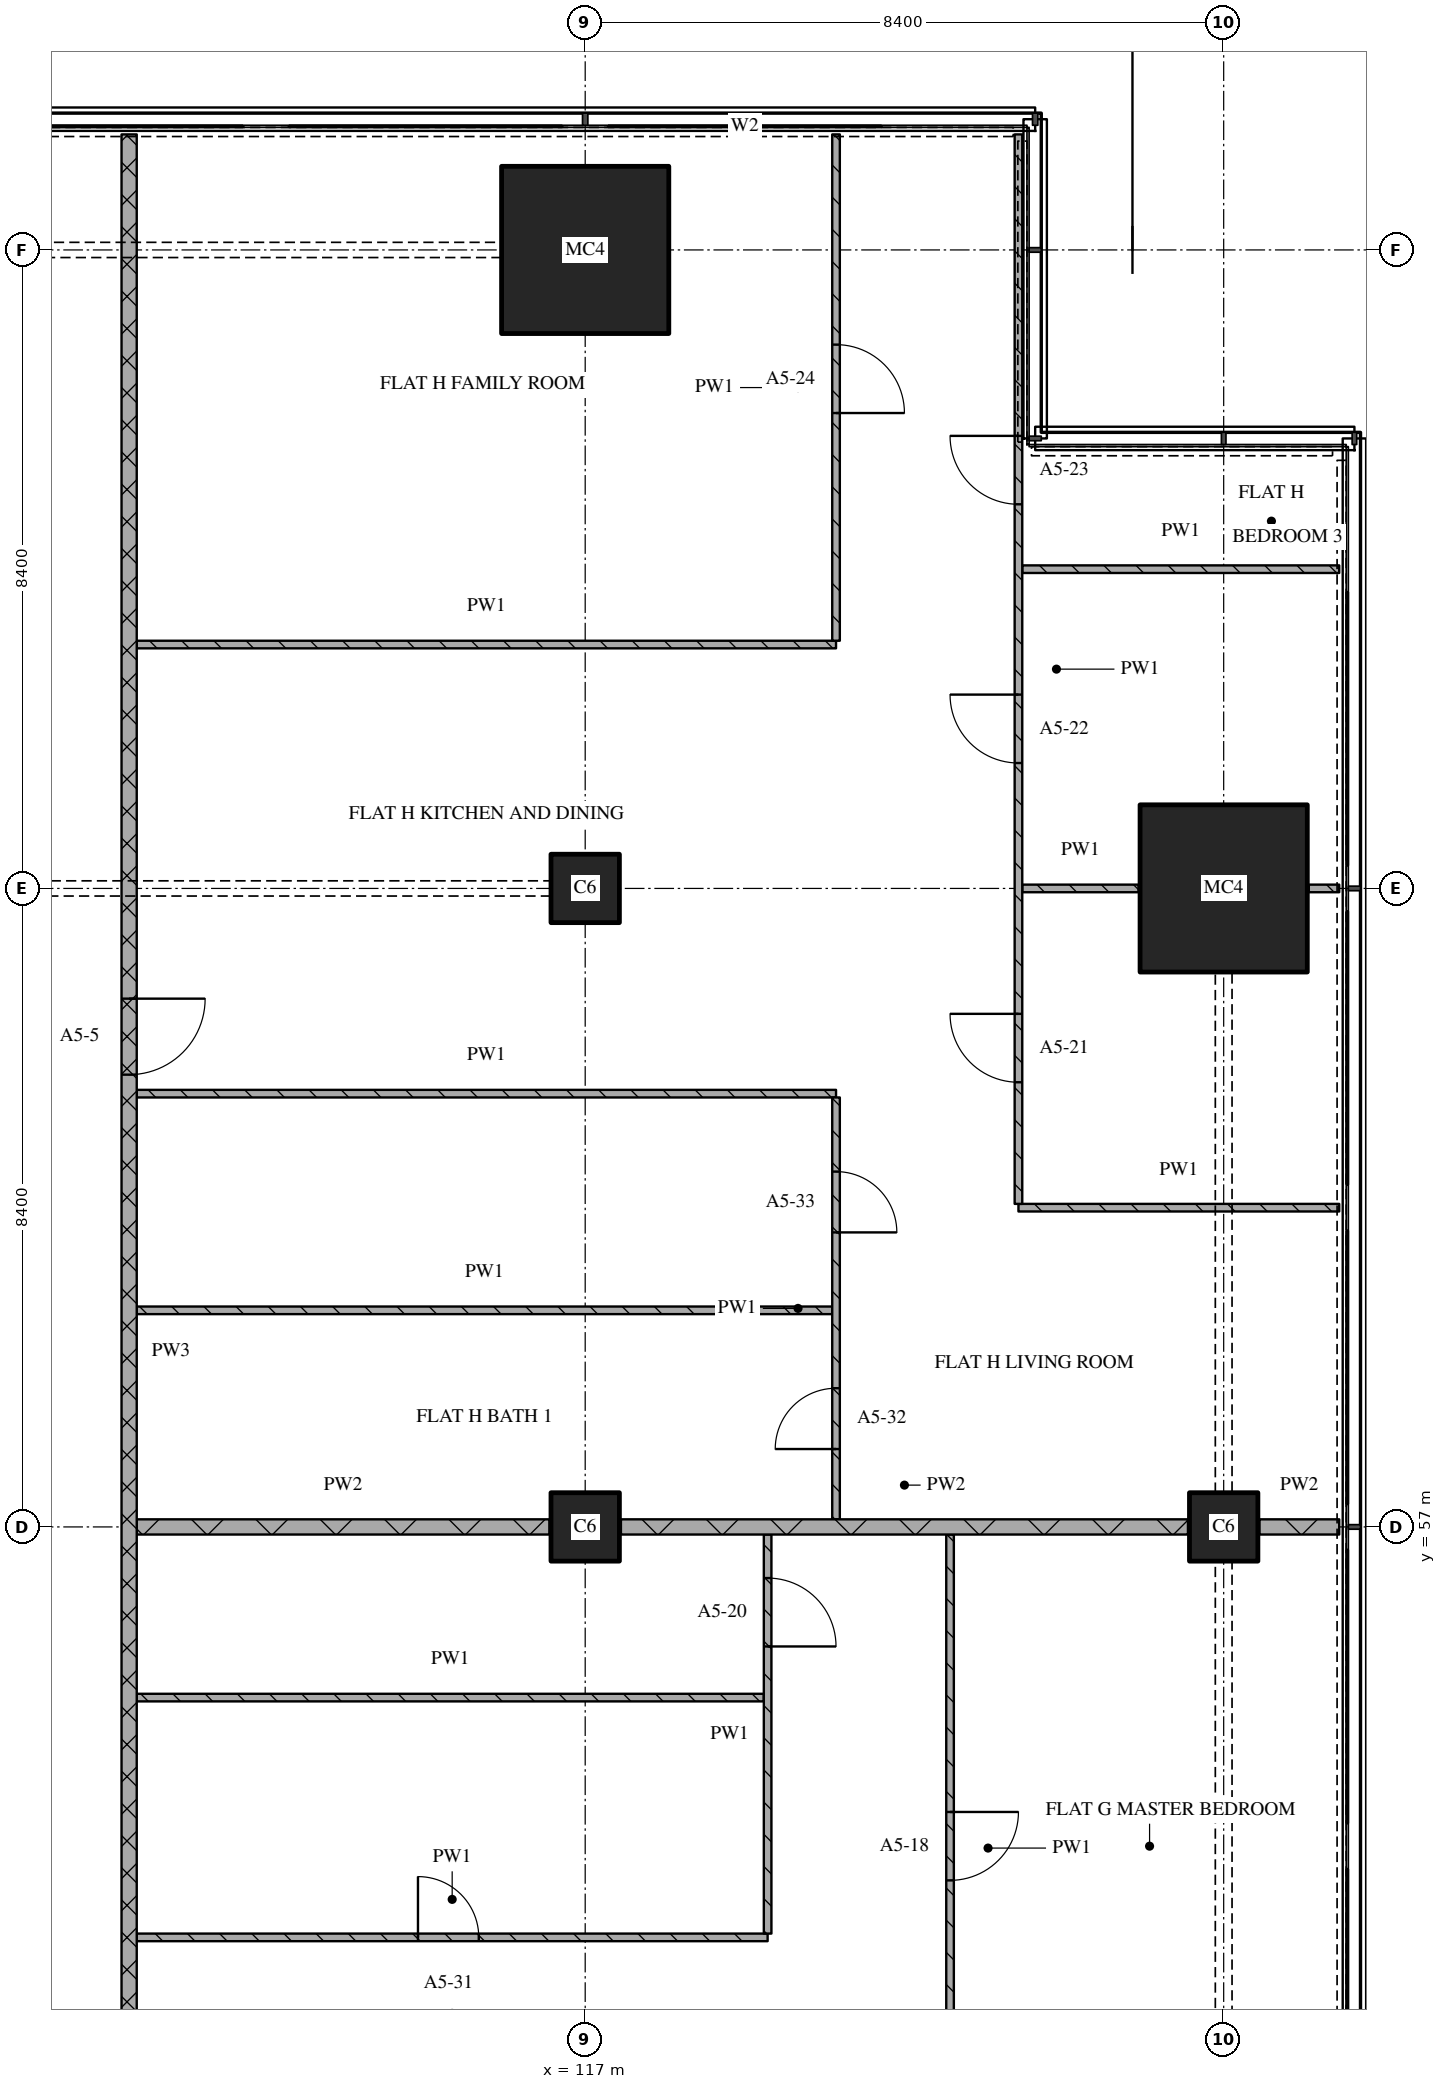
"""IFC4 building model, lengths in metres.
Left out: names, types, materials, properties, quantities, classifications, styles, units other than length and angle.
Written with IfcOpenShell. Run it as: python <this file> out.ifc"""

import sys

from ifc_helpers import new_model, si_unit, direction, frame, frame_2d, origin, origin_2d, place, context, subcontext, project, spatial, rectangle, extrude, element, fill, save


model = new_model("IFC4")
c1 = context("Model", 3, precision=1e-05, world=origin(), true_north=direction((0.0, 1.0)))
c2 = subcontext(c1, "Body", "Model", "MODEL_VIEW")
j1 = project(units=[si_unit("LENGTHUNIT", "METRE"), si_unit("PLANEANGLEUNIT", "RADIAN")], contexts=[c1])
p1 = place(None, origin())
s1 = spatial("IfcSite", under=j1, at=p1, CompositionType="ELEMENT")
p2 = place(p1, origin())
s2 = spatial("IfcBuilding", under=s1, at=p2, CompositionType="ELEMENT")
p3 = place(p2, frame((0.0, 0.0, 80.4)))
s3 = spatial("IfcBuildingStorey", under=s2, at=p3, CompositionType="ELEMENT", Elevation=80.4)
for number, where, z_axis, x_axis in (
    (1, (117.0, 57.0, 0.0), (0.0, 0.0, 1.0), (1.0, 0.0, 0.0)),
    (2, (117.0, 65.4, 0.0), (0.0, 0.0, 1.0), (1.0, 0.0, 0.0)),
):
    element("IfcColumn", number, at=place(p3, frame(where, z_axis=z_axis, x_axis=x_axis)), inside=s3, PredefinedType="COLUMN", context=c2, shape_type="SweptSolid", body=[
        extrude(rectangle(XDim=0.9, YDim=0.9, at=origin_2d()), origin(), (0.0, 0.0, 1.0), 3.6),
    ])
p4 = place(p3, frame((117.0, 73.8, 0.0), z_axis=(0.0, 0.0, 1.0), x_axis=(1.0, 0.0, 0.0)))
e3 = element("IfcColumn", 3, at=p4, inside=s3, PredefinedType="COLUMN", context=c2, shape_type="SweptSolid", body=[
    extrude(rectangle(XDim=2.2, YDim=2.2, at=origin_2d()), origin(), (0.0, 0.0, 1.0), 3.6),
])
p5 = place(p3, frame((125.4, 57.0, 0.0), z_axis=(0.0, 0.0, 1.0), x_axis=(1.0, 0.0, 0.0)))
e4 = element("IfcColumn", 4, at=p5, inside=s3, PredefinedType="COLUMN", context=c2, shape_type="SweptSolid", body=[
    extrude(rectangle(XDim=0.9, YDim=0.9, at=origin_2d()), origin(), (0.0, 0.0, 1.0), 3.6),
])
p6 = place(p3, frame((125.4, 65.4, 0.0), z_axis=(0.0, 0.0, 1.0), x_axis=(1.0, 0.0, 0.0)))
e5 = element("IfcColumn", 5, at=p6, inside=s3, PredefinedType="COLUMN", context=c2, shape_type="SweptSolid", body=[
    extrude(rectangle(XDim=2.2, YDim=2.2, at=origin_2d()), origin(), (0.0, 0.0, 1.0), 3.6),
])
p7 = place(p3, frame((111.1, 51.6, 0.0), z_axis=(0.0, 0.0, 1.0), x_axis=(1.0, 0.0, 0.0)))
e6 = element("IfcWall", 6, at=p7, inside=s3, PredefinedType="PARTITIONING", context=c2, shape_type="SweptSolid", body=[
    extrude(rectangle(XDim=8.3, YDim=0.1, at=frame_2d((4.15, 0.0))), origin(), (0.0, 0.0, 1.0), 3.3),
])
p8 = place(p7, frame((3.7, 0.0, 0.0)))
e7 = element("IfcOpeningElement", 7, at=p8, cuts=e6, PredefinedType="OPENING", context=c2, shape_type="SweptSolid", body=[
    extrude(rectangle(XDim=0.8, YDim=2.1, at=frame_2d((0.4, 1.05))), frame((0.0, 0.06, 0.0), z_axis=(0.0, -1.0, 0.0), x_axis=(1.0, 0.0, 0.0)), (0.0, 0.0, 1.0), 0.12),
])
p9 = place(p3, frame((111.1, 54.755, 0.0), z_axis=(0.0, 0.0, 1.0), x_axis=(1.0, 0.0, 0.0)))
e8 = element("IfcWall", 8, at=p9, inside=s3, PredefinedType="PARTITIONING", context=c2, shape_type="SweptSolid", body=[
    extrude(rectangle(XDim=8.25, YDim=0.1, at=frame_2d((4.125, 0.0))), origin(), (0.0, 0.0, 1.0), 3.3),
])
p10 = place(p3, frame((111.1, 57.0, 0.0), z_axis=(0.0, 0.0, 1.0), x_axis=(1.0, 0.0, 0.0)))
e9 = element("IfcWall", 9, at=p10, inside=s3, PredefinedType="PARTITIONING", context=c2, shape_type="SweptSolid", body=[
    extrude(rectangle(XDim=5.43, YDim=0.2, at=frame_2d((2.715, 0.0))), origin(), (0.0, 0.0, 1.0), 3.3),
])
p11 = place(p3, frame((117.47, 57.0, 0.0), z_axis=(0.0, 0.0, 1.0), x_axis=(1.0, 0.0, 0.0)))
e10 = element("IfcWall", 10, at=p11, inside=s3, PredefinedType="PARTITIONING", context=c2, shape_type="SweptSolid", body=[
    extrude(rectangle(XDim=7.46, YDim=0.2, at=frame_2d((3.73, 0.0))), origin(), (0.0, 0.0, 1.0), 3.3),
])
p12 = place(p3, frame((125.87, 57.0, 0.0), z_axis=(0.0, 0.0, 1.0), x_axis=(1.0, 0.0, 0.0)))
e11 = element("IfcWall", 11, at=p12, inside=s3, PredefinedType="PARTITIONING", context=c2, shape_type="SweptSolid", body=[
    extrude(rectangle(XDim=1.05, YDim=0.2, at=frame_2d((0.525, 0.0))), origin(), (0.0, 0.0, 1.0), 3.3),
])
p13 = place(p3, frame((111.1, 59.85, 0.0), z_axis=(0.0, 0.0, 1.0), x_axis=(1.0, 0.0, 0.0)))
e12 = element("IfcWall", 12, at=p13, inside=s3, PredefinedType="PARTITIONING", context=c2, shape_type="SweptSolid", body=[
    extrude(rectangle(XDim=9.15, YDim=0.1, at=frame_2d((4.575, 0.0))), origin(), (0.0, 0.0, 1.0), 3.3),
])
p14 = place(p3, frame((122.7, 61.2, 0.0), z_axis=(0.0, 0.0, 1.0), x_axis=(1.0, 0.0, 0.0)))
e13 = element("IfcWall", 13, at=p14, inside=s3, PredefinedType="PARTITIONING", context=c2, shape_type="SweptSolid", body=[
    extrude(rectangle(XDim=4.22, YDim=0.1, at=frame_2d((2.11, 0.0))), origin(), (0.0, 0.0, 1.0), 3.3),
])
p15 = place(p3, frame((111.1, 62.7, 0.0), z_axis=(0.0, 0.0, 1.0), x_axis=(1.0, 0.0, 0.0)))
e14 = element("IfcWall", 14, at=p15, inside=s3, PredefinedType="PARTITIONING", context=c2, shape_type="SweptSolid", body=[
    extrude(rectangle(XDim=9.2, YDim=0.1, at=frame_2d((4.6, 0.0))), origin(), (0.0, 0.0, 1.0), 3.3),
])
p16 = place(p3, frame((122.75, 65.4, 0.0), z_axis=(0.0, 0.0, 1.0), x_axis=(1.0, 0.0, 0.0)))
e15 = element("IfcWall", 15, at=p16, inside=s3, PredefinedType="PARTITIONING", context=c2, shape_type="SweptSolid", body=[
    extrude(rectangle(XDim=1.53, YDim=0.1, at=frame_2d((0.765, 0.0))), origin(), (0.0, 0.0, 1.0), 2.41),
])
p17 = place(p3, frame((126.52, 65.4, 0.0), z_axis=(0.0, 0.0, 1.0), x_axis=(1.0, 0.0, 0.0)))
e16 = element("IfcWall", 16, at=p17, inside=s3, PredefinedType="PARTITIONING", context=c2, shape_type="SweptSolid", body=[
    extrude(rectangle(XDim=0.4, YDim=0.1, at=frame_2d((0.2, 0.0))), origin(), (0.0, 0.0, 1.0), 3.3),
])
p18 = place(p3, frame((111.1, 68.609, 0.0), z_axis=(0.0, 0.0, 1.0), x_axis=(1.0, 0.0, 0.0)))
e17 = element("IfcWall", 17, at=p18, inside=s3, PredefinedType="PARTITIONING", context=c2, shape_type="SweptSolid", body=[
    extrude(rectangle(XDim=9.2, YDim=0.1, at=frame_2d((4.6, 0.0))), origin(), (0.0, 0.0, 1.0), 3.3),
])
p19 = place(p3, frame((122.75, 69.6, 0.0), z_axis=(0.0, 0.0, 1.0), x_axis=(1.0, 0.0, 0.0)))
e18 = element("IfcWall", 18, at=p19, inside=s3, PredefinedType="PARTITIONING", context=c2, shape_type="SweptSolid", body=[
    extrude(rectangle(XDim=4.17, YDim=0.1, at=frame_2d((2.085, 0.0))), origin(), (0.0, 0.0, 1.0), 3.3),
])
p20 = place(p3, frame((111.0, 75.32, 0.0), z_axis=(0.0, 0.0, 1.0), x_axis=(0.0, -1.0, 0.0)))
e19 = element("IfcWall", 19, at=p20, inside=s3, PredefinedType="PARTITIONING", context=c2, shape_type="SweptSolid", body=[
    extrude(rectangle(XDim=32.02, YDim=0.2, at=frame_2d((16.01, 0.0))), origin(), (0.0, 0.0, 1.0), 3.3),
])
p21 = place(p20, frame((11.37, 0.0, 0.0)))
e20 = element("IfcOpeningElement", 20, at=p21, cuts=e19, PredefinedType="OPENING", context=c2, shape_type="SweptSolid", body=[
    extrude(rectangle(XDim=1.0, YDim=2.1, at=frame_2d((0.5, 1.05))), frame((0.0, 0.11, 0.0), z_axis=(0.0, -1.0, 0.0), x_axis=(1.0, 0.0, 0.0)), (0.0, 0.0, 1.0), 0.22),
])
p22 = place(p3, frame((119.4, 51.65, 0.0), z_axis=(0.0, 0.0, 1.0), x_axis=(0.0, 1.0, 0.0)))
e21 = element("IfcWall", 21, at=p22, inside=s3, PredefinedType="PARTITIONING", context=c2, shape_type="SweptSolid", body=[
    extrude(rectangle(XDim=5.25, YDim=0.1, at=frame_2d((2.625, 0.0))), origin(), (0.0, 0.0, 1.0), 3.3),
])
p23 = place(p22, frame((3.777, 0.0, 0.0)))
e22 = element("IfcOpeningElement", 22, at=p23, cuts=e21, PredefinedType="OPENING", context=c2, shape_type="SweptSolid", body=[
    extrude(rectangle(XDim=0.9, YDim=2.1, at=frame_2d((0.45, 1.05))), frame((0.0, 0.06, 0.0), z_axis=(0.0, -1.0, 0.0), x_axis=(1.0, 0.0, 0.0)), (0.0, 0.0, 1.0), 0.12),
])
p24 = place(p3, frame((120.3, 57.1, 0.0), z_axis=(0.0, 0.0, 1.0), x_axis=(0.0, 1.0, 0.0)))
e23 = element("IfcWall", 23, at=p24, inside=s3, PredefinedType="PARTITIONING", context=c2, shape_type="SweptSolid", body=[
    extrude(rectangle(XDim=5.55, YDim=0.1, at=frame_2d((2.775, 0.0))), origin(), (0.0, 0.0, 1.0), 3.3),
])
p25 = place(p24, frame((0.925, 0.0, 0.0)))
e24 = element("IfcOpeningElement", 24, at=p25, cuts=e23, PredefinedType="OPENING", context=c2, shape_type="SweptSolid", body=[
    extrude(rectangle(XDim=0.8, YDim=2.1, at=frame_2d((0.4, 1.05))), frame((0.0, 0.06, 0.0), z_axis=(0.0, -1.0, 0.0), x_axis=(1.0, 0.0, 0.0)), (0.0, 0.0, 1.0), 0.12),
])
p26 = place(p24, frame((3.775, 0.0, 0.0)))
e25 = element("IfcOpeningElement", 25, at=p26, cuts=e23, PredefinedType="OPENING", context=c2, shape_type="SweptSolid", body=[
    extrude(rectangle(XDim=0.8, YDim=2.1, at=frame_2d((0.4, 1.05))), frame((0.0, 0.06, 0.0), z_axis=(0.0, -1.0, 0.0), x_axis=(1.0, 0.0, 0.0)), (0.0, 0.0, 1.0), 0.12),
])
p27 = place(p3, frame((120.3, 68.659, 0.0), z_axis=(0.0, 0.0, 1.0), x_axis=(0.0, 1.0, 0.0)))
e26 = element("IfcWall", 26, at=p27, inside=s3, PredefinedType="PARTITIONING", context=c2, shape_type="SweptSolid", body=[
    extrude(rectangle(XDim=6.661, YDim=0.1, at=frame_2d((3.331, 0.0))), origin(), (0.0, 0.0, 1.0), 3.3),
])
p28 = place(p27, frame((2.996, 0.0, 0.0)))
e27 = element("IfcOpeningElement", 27, at=p28, cuts=e26, PredefinedType="OPENING", context=c2, shape_type="SweptSolid", body=[
    extrude(rectangle(XDim=0.9, YDim=2.1, at=frame_2d((0.45, 1.05))), frame((0.0, 0.06, 0.0), z_axis=(0.0, -1.0, 0.0), x_axis=(1.0, 0.0, 0.0)), (0.0, 0.0, 1.0), 0.12),
])
p29 = place(p3, frame((121.8, 56.9, 0.0), z_axis=(0.0, 0.0, 1.0), x_axis=(0.0, -1.0, 0.0)))
e28 = element("IfcWall", 28, at=p29, inside=s3, PredefinedType="PARTITIONING", context=c2, shape_type="SweptSolid", body=[
    extrude(rectangle(XDim=8.25, YDim=0.1, at=frame_2d((4.125, 0.0))), origin(), (0.0, 0.0, 1.0), 3.3),
])
p30 = place(p29, frame((3.65, 0.0, 0.0)))
e29 = element("IfcOpeningElement", 29, at=p30, cuts=e28, PredefinedType="OPENING", context=c2, shape_type="SweptSolid", body=[
    extrude(rectangle(XDim=0.9, YDim=2.1, at=frame_2d((0.45, 1.05))), frame((0.0, 0.06, 0.0), z_axis=(0.0, -1.0, 0.0), x_axis=(1.0, 0.0, 0.0)), (0.0, 0.0, 1.0), 0.12),
])
p31 = place(p3, frame((122.7, 75.32, 0.0), z_axis=(0.0, 0.0, 1.0), x_axis=(0.0, -1.0, 0.0)))
e30 = element("IfcWall", 30, at=p31, inside=s3, PredefinedType="PARTITIONING", context=c2, shape_type="SweptSolid", body=[
    extrude(rectangle(XDim=14.07, YDim=0.1, at=frame_2d((7.035, 0.0))), origin(), (0.0, 0.0, 1.0), 3.3),
])
p32 = place(p31, frame((3.966, 0.0, 0.0)))
e31 = element("IfcOpeningElement", 31, at=p32, cuts=e30, PredefinedType="OPENING", context=c2, shape_type="SweptSolid", body=[
    extrude(rectangle(XDim=0.9, YDim=2.1, at=frame_2d((0.45, 1.05))), frame((0.0, 0.06, 0.0), z_axis=(0.0, -1.0, 0.0), x_axis=(1.0, 0.0, 0.0)), (0.0, 0.0, 1.0), 0.12),
])
p33 = place(p31, frame((7.37, 0.0, 0.0)))
e32 = element("IfcOpeningElement", 32, at=p33, cuts=e30, PredefinedType="OPENING", context=c2, shape_type="SweptSolid", body=[
    extrude(rectangle(XDim=0.9, YDim=2.1, at=frame_2d((0.45, 1.05))), frame((0.0, 0.06, 0.0), z_axis=(0.0, -1.0, 0.0), x_axis=(1.0, 0.0, 0.0)), (0.0, 0.0, 1.0), 0.12),
])
p34 = place(p31, frame((11.57, 0.0, 0.0)))
e33 = element("IfcOpeningElement", 33, at=p34, cuts=e30, PredefinedType="OPENING", context=c2, shape_type="SweptSolid", body=[
    extrude(rectangle(XDim=0.9, YDim=2.1, at=frame_2d((0.45, 1.05))), frame((0.0, 0.06, 0.0), z_axis=(0.0, -1.0, 0.0), x_axis=(1.0, 0.0, 0.0)), (0.0, 0.0, 1.0), 0.12),
])
p35 = place(p8, origin())
e34 = element("IfcDoor", 34, at=p35, inside=s3, OperationType="SINGLE_SWING_LEFT", PredefinedType="DOOR", context=c2, shape_type="SweptSolid", body=[
    extrude(rectangle(XDim=0.8, YDim=2.1, at=frame_2d((0.4, 1.05))), frame((0.0, 0.025, 0.0), z_axis=(0.0, -1.0, 0.0), x_axis=(1.0, 0.0, 0.0)), (0.0, 0.0, 1.0), 0.05),
])
fill(e7, e34)
p36 = place(p21, origin())
e35 = element("IfcDoor", 35, at=p36, inside=s3, OperationType="SINGLE_SWING_LEFT", PredefinedType="DOOR", context=c2, shape_type="SweptSolid", body=[
    extrude(rectangle(XDim=1.0, YDim=2.1, at=frame_2d((0.5, 1.05))), frame((0.0, 0.025, 0.0), z_axis=(0.0, -1.0, 0.0), x_axis=(1.0, 0.0, 0.0)), (0.0, 0.0, 1.0), 0.05),
])
fill(e20, e35)
p37 = place(p23, origin())
e36 = element("IfcDoor", 36, at=p37, inside=s3, OperationType="SINGLE_SWING_RIGHT", PredefinedType="DOOR", context=c2, shape_type="SweptSolid", body=[
    extrude(rectangle(XDim=0.9, YDim=2.1, at=frame_2d((0.45, 1.05))), frame((0.0, 0.025, 0.0), z_axis=(0.0, -1.0, 0.0), x_axis=(1.0, 0.0, 0.0)), (0.0, 0.0, 1.0), 0.05),
])
fill(e22, e36)
p38 = place(p25, origin())
e37 = element("IfcDoor", 37, at=p38, inside=s3, OperationType="SINGLE_SWING_LEFT", PredefinedType="DOOR", context=c2, shape_type="SweptSolid", body=[
    extrude(rectangle(XDim=0.8, YDim=2.1, at=frame_2d((0.4, 1.05))), frame((0.0, 0.025, 0.0), z_axis=(0.0, -1.0, 0.0), x_axis=(1.0, 0.0, 0.0)), (0.0, 0.0, 1.0), 0.05),
])
fill(e24, e37)
p39 = place(p26, origin())
e38 = element("IfcDoor", 38, at=p39, inside=s3, OperationType="SINGLE_SWING_RIGHT", PredefinedType="DOOR", context=c2, shape_type="SweptSolid", body=[
    extrude(rectangle(XDim=0.8, YDim=2.1, at=frame_2d((0.4, 1.05))), frame((0.0, 0.025, 0.0), z_axis=(0.0, -1.0, 0.0), x_axis=(1.0, 0.0, 0.0)), (0.0, 0.0, 1.0), 0.05),
])
fill(e25, e38)
p40 = place(p28, origin())
e39 = element("IfcDoor", 39, at=p40, inside=s3, OperationType="SINGLE_SWING_RIGHT", PredefinedType="DOOR", context=c2, shape_type="SweptSolid", body=[
    extrude(rectangle(XDim=0.9, YDim=2.1, at=frame_2d((0.45, 1.05))), frame((0.0, 0.025, 0.0), z_axis=(0.0, -1.0, 0.0), x_axis=(1.0, 0.0, 0.0)), (0.0, 0.0, 1.0), 0.05),
])
fill(e27, e39)
p41 = place(p30, origin())
e40 = element("IfcDoor", 40, at=p41, inside=s3, OperationType="SINGLE_SWING_LEFT", PredefinedType="DOOR", context=c2, shape_type="SweptSolid", body=[
    extrude(rectangle(XDim=0.9, YDim=2.1, at=frame_2d((0.45, 1.05))), frame((0.0, 0.025, 0.0), z_axis=(0.0, -1.0, 0.0), x_axis=(1.0, 0.0, 0.0)), (0.0, 0.0, 1.0), 0.05),
])
fill(e29, e40)
p42 = place(p32, origin())
e41 = element("IfcDoor", 41, at=p42, inside=s3, OperationType="SINGLE_SWING_RIGHT", PredefinedType="DOOR", context=c2, shape_type="SweptSolid", body=[
    extrude(rectangle(XDim=0.9, YDim=2.1, at=frame_2d((0.45, 1.05))), frame((0.0, 0.025, 0.0), z_axis=(0.0, -1.0, 0.0), x_axis=(1.0, 0.0, 0.0)), (0.0, 0.0, 1.0), 0.05),
])
fill(e31, e41)
p43 = place(p33, origin())
e42 = element("IfcDoor", 42, at=p43, inside=s3, OperationType="SINGLE_SWING_RIGHT", PredefinedType="DOOR", context=c2, shape_type="SweptSolid", body=[
    extrude(rectangle(XDim=0.9, YDim=2.1, at=frame_2d((0.45, 1.05))), frame((0.0, 0.025, 0.0), z_axis=(0.0, -1.0, 0.0), x_axis=(1.0, 0.0, 0.0)), (0.0, 0.0, 1.0), 0.05),
])
fill(e32, e42)
p44 = place(p34, origin())
e43 = element("IfcDoor", 43, at=p44, inside=s3, OperationType="SINGLE_SWING_RIGHT", PredefinedType="DOOR", context=c2, shape_type="SweptSolid", body=[
    extrude(rectangle(XDim=0.9, YDim=2.1, at=frame_2d((0.45, 1.05))), frame((0.0, 0.025, 0.0), z_axis=(0.0, -1.0, 0.0), x_axis=(1.0, 0.0, 0.0)), (0.0, 0.0, 1.0), 0.05),
])
fill(e33, e43)
save(model, sys.argv[1])
